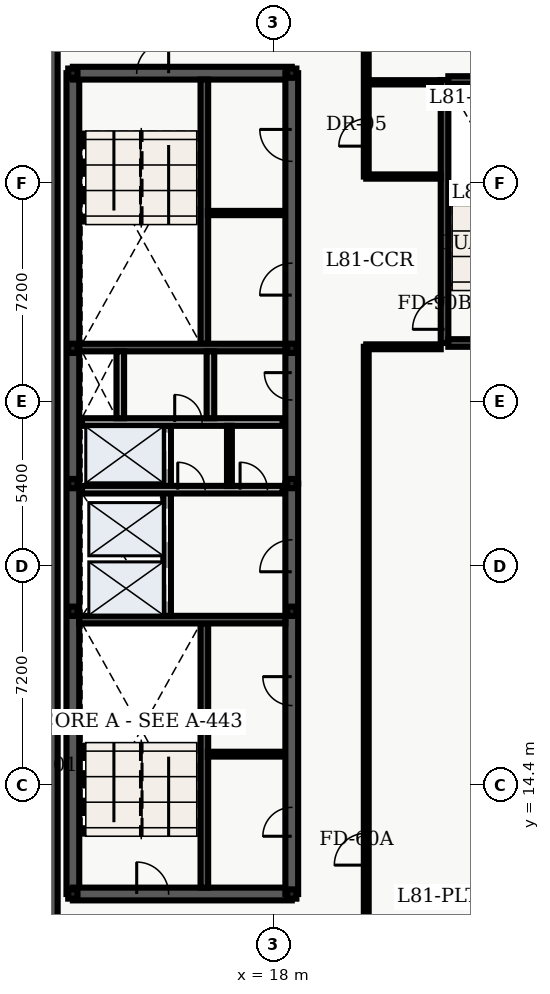
"""IFC4 building model, lengths in metres.
Left out: names, types, materials, properties, quantities, classifications, styles, units other than length and angle.
Written with IfcOpenShell. Run it as: python <this file> out.ifc"""

import sys

from ifc_helpers import new_model, entity, si_unit, converted_unit, direction, frame, origin_with_axes, origin_2d_with_axis, place, context, subcontext, project, spatial, polyline, rectangle, hollow_rectangle, outline, extrude, element, fill, save


model = new_model("IFC4")
c1 = context("Model", 3, precision=1e-05, world=origin_with_axes(), true_north=direction((0.0, 1.0)))
c2 = subcontext(c1, "Body", "Model", "MODEL_VIEW")
j1 = project(units=[si_unit("LENGTHUNIT", "METRE"), converted_unit("PLANEANGLEUNIT", "DEGREE", entity("IfcPlaneAngleMeasure", 0.017), si_unit("PLANEANGLEUNIT", "RADIAN"), dimensions=[0, 0, 0, 0, 0, 0, 0])], contexts=[c1])
p1 = place(None, origin_with_axes())
s1 = spatial("IfcSite", under=j1, at=p1, CompositionType="ELEMENT")
p2 = place(p1, origin_with_axes())
s2 = spatial("IfcBuilding", under=s1, at=p2, CompositionType="ELEMENT")
p3 = place(p2, frame((0.0, 0.0, 328.2), z_axis=(0.0, 0.0, 1.0), x_axis=(1.0, 0.0, 0.0)))
s3 = spatial("IfcBuildingStorey", under=s2, at=p3, CompositionType="ELEMENT", Elevation=328.2)
p4 = place(p3, frame((11.4, 10.8, 0.0), z_axis=(0.0, 0.0, 1.0), x_axis=(0.0, 1.0, 0.0)))
e1 = element("IfcWall", 1, at=p4, inside=s3, PredefinedType="SHEAR", context=c2, shape_type="SweptSolid", body=[
    extrude(outline(polyline([(0.0, -0.21), (27.0, -0.21), (27.0, 0.21), (0.0, 0.21), (0.0, -0.21)])), origin_with_axes(), (0.0, 0.0, 1.0), 3.64),
])
p5 = place(p3, frame((11.4, 10.8, 0.0), z_axis=(0.0, 0.0, 1.0), x_axis=(1.0, 0.0, 0.0)))
e2 = element("IfcWall", 2, at=p5, inside=s3, PredefinedType="SHEAR", context=c2, shape_type="SweptSolid", body=[
    extrude(outline(polyline([(0.0, -0.21), (7.2, -0.21), (7.2, 0.21), (0.0, 0.21), (0.0, -0.21)])), origin_with_axes(), (0.0, 0.0, 1.0), 3.64),
])
p6 = place(p5, frame((2.625, 0.0, 0.0), z_axis=(0.0, 0.0, 1.0), x_axis=(1.0, 0.0, 0.0)))
e3 = element("IfcOpeningElement", 3, at=p6, cuts=e2, PredefinedType="OPENING", context=c2, shape_type="SweptSolid", body=[
    extrude(rectangle(XDim=1.05, YDim=0.44, at=origin_2d_with_axis()), origin_with_axes(), (0.0, 0.0, 1.0), 2.15),
])
p7 = place(p3, frame((11.4, 37.8, 0.0), z_axis=(0.0, 0.0, 1.0), x_axis=(1.0, 0.0, 0.0)))
e4 = element("IfcWall", 4, at=p7, inside=s3, PredefinedType="SHEAR", context=c2, shape_type="SweptSolid", body=[
    extrude(outline(polyline([(0.0, -0.21), (7.2, -0.21), (7.2, 0.21), (0.0, 0.21), (0.0, -0.21)])), origin_with_axes(), (0.0, 0.0, 1.0), 3.64),
])
p8 = place(p7, frame((2.625, 0.0, 0.0), z_axis=(0.0, 0.0, 1.0), x_axis=(1.0, 0.0, 0.0)))
e5 = element("IfcOpeningElement", 5, at=p8, cuts=e4, PredefinedType="OPENING", context=c2, shape_type="SweptSolid", body=[
    extrude(rectangle(XDim=1.05, YDim=0.44, at=origin_2d_with_axis()), origin_with_axes(), (0.0, 0.0, 1.0), 2.15),
])
p9 = place(p3, frame((18.6, 10.8, 0.0), z_axis=(0.0, 0.0, 1.0), x_axis=(0.0, 1.0, 0.0)))
e6 = element("IfcWall", 6, at=p9, inside=s3, PredefinedType="SHEAR", context=c2, shape_type="SweptSolid", body=[
    extrude(outline(polyline([(0.0, -0.21), (13.5, -0.21), (13.5, 0.21), (0.0, 0.21), (0.0, -0.21)])), origin_with_axes(), (0.0, 0.0, 1.0), 3.64),
])
p10 = place(p9, frame((11.125, 0.0, 0.0), z_axis=(0.0, 0.0, 1.0), x_axis=(1.0, 0.0, 0.0)))
e7 = element("IfcOpeningElement", 7, at=p10, cuts=e6, PredefinedType="OPENING", context=c2, shape_type="SweptSolid", body=[
    extrude(rectangle(XDim=1.05, YDim=0.44, at=origin_2d_with_axis()), origin_with_axes(), (0.0, 0.0, 1.0), 2.15),
])
p11 = place(p9, frame((2.375, 0.0, 0.0), z_axis=(0.0, 0.0, 1.0), x_axis=(1.0, 0.0, 0.0)))
e8 = element("IfcOpeningElement", 8, at=p11, cuts=e6, PredefinedType="OPENING", context=c2, shape_type="SweptSolid", body=[
    extrude(rectangle(XDim=0.95, YDim=0.44, at=origin_2d_with_axis()), origin_with_axes(), (0.0, 0.0, 1.0), 2.15),
])
p12 = place(p9, frame((6.675, 0.0, 0.0), z_axis=(0.0, 0.0, 1.0), x_axis=(1.0, 0.0, 0.0)))
e9 = element("IfcOpeningElement", 9, at=p12, cuts=e6, PredefinedType="OPENING", context=c2, shape_type="SweptSolid", body=[
    extrude(rectangle(XDim=0.95, YDim=0.44, at=origin_2d_with_axis()), origin_with_axes(), (0.0, 0.0, 1.0), 2.15),
])
p13 = place(p3, frame((18.6, 24.3, 0.0), z_axis=(0.0, 0.0, 1.0), x_axis=(0.0, 1.0, 0.0)))
e10 = element("IfcWall", 10, at=p13, inside=s3, PredefinedType="SHEAR", context=c2, shape_type="SweptSolid", body=[
    extrude(outline(polyline([(0.0, -0.21), (13.5, -0.21), (13.5, 0.21), (0.0, 0.21), (0.0, -0.21)])), origin_with_axes(), (0.0, 0.0, 1.0), 3.64),
])
p14 = place(p13, frame((3.2, 0.0, 0.0), z_axis=(0.0, 0.0, 1.0), x_axis=(1.0, 0.0, 0.0)))
e11 = element("IfcOpeningElement", 11, at=p14, cuts=e10, PredefinedType="OPENING", context=c2, shape_type="SweptSolid", body=[
    extrude(rectangle(XDim=0.9, YDim=0.44, at=origin_2d_with_axis()), origin_with_axes(), (0.0, 0.0, 1.0), 2.15),
])
p15 = place(p13, frame((6.725, 0.0, 0.0), z_axis=(0.0, 0.0, 1.0), x_axis=(1.0, 0.0, 0.0)))
e12 = element("IfcOpeningElement", 12, at=p15, cuts=e10, PredefinedType="OPENING", context=c2, shape_type="SweptSolid", body=[
    extrude(rectangle(XDim=1.05, YDim=0.44, at=origin_2d_with_axis()), origin_with_axes(), (0.0, 0.0, 1.0), 2.15),
])
p16 = place(p13, frame((11.125, 0.0, 0.0), z_axis=(0.0, 0.0, 1.0), x_axis=(1.0, 0.0, 0.0)))
e13 = element("IfcOpeningElement", 13, at=p16, cuts=e10, PredefinedType="OPENING", context=c2, shape_type="SweptSolid", body=[
    extrude(rectangle(XDim=1.05, YDim=0.44, at=origin_2d_with_axis()), origin_with_axes(), (0.0, 0.0, 1.0), 2.15),
])
p17 = place(p3, frame((15.725, 11.01, 0.0), z_axis=(0.0, 0.0, 1.0), x_axis=(0.0, 1.0, 0.0)))
e14 = element("IfcWall", 14, at=p17, inside=s3, PredefinedType="SHEAR", context=c2, shape_type="SweptSolid", body=[
    extrude(outline(polyline([(0.0, -0.125), (8.69, -0.125), (8.69, 0.125), (0.0, 0.125), (0.0, -0.125)])), origin_with_axes(), (0.0, 0.0, 1.0), 3.64),
])
p18 = place(p3, frame((11.61, 19.825, 0.0), z_axis=(0.0, 0.0, 1.0), x_axis=(1.0, 0.0, 0.0)))
e15 = element("IfcWall", 15, at=p18, inside=s3, PredefinedType="SHEAR", context=c2, shape_type="SweptSolid", body=[
    extrude(outline(polyline([(0.0, -0.125), (6.78, -0.125), (6.78, 0.125), (0.0, 0.125), (0.0, -0.125)])), origin_with_axes(), (0.0, 0.0, 1.0), 3.64),
])
p19 = place(p3, frame((15.725, 28.9, 0.0), z_axis=(0.0, 0.0, 1.0), x_axis=(0.0, 1.0, 0.0)))
e16 = element("IfcWall", 16, at=p19, inside=s3, PredefinedType="SHEAR", context=c2, shape_type="SweptSolid", body=[
    extrude(outline(polyline([(0.0, -0.125), (8.69, -0.125), (8.69, 0.125), (0.0, 0.125), (0.0, -0.125)])), origin_with_axes(), (0.0, 0.0, 1.0), 3.64),
])
p20 = place(p3, frame((11.61, 28.775, 0.0), z_axis=(0.0, 0.0, 1.0), x_axis=(1.0, 0.0, 0.0)))
e17 = element("IfcWall", 17, at=p20, inside=s3, PredefinedType="SHEAR", context=c2, shape_type="SweptSolid", body=[
    extrude(outline(polyline([(0.0, -0.125), (6.78, -0.125), (6.78, 0.125), (0.0, 0.125), (0.0, -0.125)])), origin_with_axes(), (0.0, 0.0, 1.0), 3.64),
])
p21 = place(p3, frame((14.5, 19.95, 0.0), z_axis=(0.0, 0.0, 1.0), x_axis=(0.0, 1.0, 0.0)))
e18 = element("IfcWall", 18, at=p21, inside=s3, PredefinedType="SOLIDWALL", context=c2, shape_type="SweptSolid", body=[
    extrude(outline(polyline([(0.0, -0.125), (6.25, -0.125), (6.25, 0.125), (0.0, 0.125), (0.0, -0.125)])), origin_with_axes(), (0.0, 0.0, 1.0), 2.68),
])
p22 = place(p21, frame((1.025, 0.0, 0.0), z_axis=(0.0, 0.0, 1.0), x_axis=(1.0, 0.0, 0.0)))
e19 = element("IfcOpeningElement", 19, at=p22, cuts=e18, PredefinedType="OPENING", context=c2, shape_type="SweptSolid", body=[
    extrude(rectangle(XDim=1.1, YDim=0.27, at=origin_2d_with_axis()), origin_with_axes(), (0.0, 0.0, 1.0), 2.15),
])
p23 = place(p21, frame((2.975, 0.0, 0.0), z_axis=(0.0, 0.0, 1.0), x_axis=(1.0, 0.0, 0.0)))
e20 = element("IfcOpeningElement", 20, at=p23, cuts=e18, PredefinedType="OPENING", context=c2, shape_type="SweptSolid", body=[
    extrude(rectangle(XDim=1.1, YDim=0.27, at=origin_2d_with_axis()), origin_with_axes(), (0.0, 0.0, 1.0), 2.15),
])
p24 = place(p21, frame((5.425, 0.0, 0.0), z_axis=(0.0, 0.0, 1.0), x_axis=(1.0, 0.0, 0.0)))
e21 = element("IfcOpeningElement", 21, at=p24, cuts=e18, PredefinedType="OPENING", context=c2, shape_type="SweptSolid", body=[
    extrude(rectangle(XDim=1.2, YDim=0.27, at=origin_2d_with_axis()), origin_with_axes(), (0.0, 0.0, 1.0), 2.15),
])
p25 = place(p3, frame((11.7, 24.1, 0.0), z_axis=(0.0, 0.0, 1.0), x_axis=(1.0, 0.0, 0.0)))
e22 = element("IfcWall", 22, at=p25, inside=s3, PredefinedType="SOLIDWALL", context=c2, shape_type="SweptSolid", body=[
    extrude(outline(polyline([(0.0, -0.125), (6.6, -0.125), (6.6, 0.125), (0.0, 0.125), (0.0, -0.125)])), origin_with_axes(), (0.0, 0.0, 1.0), 2.68),
])
p26 = place(p25, frame((3.6, 0.0, 0.0), z_axis=(0.0, 0.0, 1.0), x_axis=(1.0, 0.0, 0.0)))
e23 = element("IfcOpeningElement", 23, at=p26, cuts=e22, PredefinedType="OPENING", context=c2, shape_type="SweptSolid", body=[
    extrude(rectangle(XDim=0.9, YDim=0.27, at=origin_2d_with_axis()), origin_with_axes(), (0.0, 0.0, 1.0), 2.15),
])
p27 = place(p25, frame((5.65, 0.0, 0.0), z_axis=(0.0, 0.0, 1.0), x_axis=(1.0, 0.0, 0.0)))
e24 = element("IfcOpeningElement", 24, at=p27, cuts=e22, PredefinedType="OPENING", context=c2, shape_type="SweptSolid", body=[
    extrude(rectangle(XDim=0.9, YDim=0.27, at=origin_2d_with_axis()), origin_with_axes(), (0.0, 0.0, 1.0), 2.15),
])
p28 = place(p3, frame((11.7, 26.325, 0.0), z_axis=(0.0, 0.0, 1.0), x_axis=(1.0, 0.0, 0.0)))
e25 = element("IfcWall", 25, at=p28, inside=s3, PredefinedType="SOLIDWALL", context=c2, shape_type="SweptSolid", body=[
    extrude(outline(polyline([(0.0, -0.125), (6.6, -0.125), (6.6, 0.125), (0.0, 0.125), (0.0, -0.125)])), origin_with_axes(), (0.0, 0.0, 1.0), 2.68),
])
p29 = place(p28, frame((3.5, 0.0, 0.0), z_axis=(0.0, 0.0, 1.0), x_axis=(1.0, 0.0, 0.0)))
e26 = element("IfcOpeningElement", 26, at=p29, cuts=e25, PredefinedType="OPENING", context=c2, shape_type="SweptSolid", body=[
    extrude(rectangle(XDim=0.9, YDim=0.27, at=origin_2d_with_axis()), origin_with_axes(), (0.0, 0.0, 1.0), 2.15),
])
for number, where, z_axis, x_axis in (
    (27, (12.96, 26.45, 0.0), (0.0, 0.0, 1.0), (0.0, 1.0, 0.0)),
    (28, (15.925, 26.45, 0.0), (0.0, 0.0, 1.0), (0.0, 1.0, 0.0)),
):
    element("IfcWall", number, at=place(p3, frame(where, z_axis=z_axis, x_axis=x_axis)), inside=s3, PredefinedType="SOLIDWALL", context=c2, shape_type="SweptSolid", body=[
        extrude(outline(polyline([(0.0, -0.125), (2.2, -0.125), (2.2, 0.125), (0.0, 0.125), (0.0, -0.125)])), origin_with_axes(), (0.0, 0.0, 1.0), 2.68),
    ])
p30 = place(p3, frame((23.625, 28.925, 0.0), z_axis=(0.0, 0.0, 1.0), x_axis=(0.0, 1.0, 0.0)))
e29 = element("IfcWall", 29, at=p30, inside=s3, PredefinedType="SHEAR", context=c2, shape_type="SweptSolid", body=[
    extrude(outline(polyline([(0.0, -0.125), (8.65, -0.125), (8.65, 0.125), (0.0, 0.125), (0.0, -0.125)])), origin_with_axes(), (0.0, 0.0, 1.0), 3.64),
])
p31 = place(p30, frame((0.975, 0.0, 0.0), z_axis=(0.0, 0.0, 1.0), x_axis=(1.0, 0.0, 0.0)))
e30 = element("IfcOpeningElement", 30, at=p31, cuts=e29, PredefinedType="OPENING", context=c2, shape_type="SweptSolid", body=[
    extrude(rectangle(XDim=1.05, YDim=0.27, at=origin_2d_with_axis()), origin_with_axes(), (0.0, 0.0, 1.0), 2.15),
])
for number, where, z_axis, x_axis in (
    (31, (23.75, 28.925, 0.0), (0.0, 0.0, 1.0), (1.0, 0.0, 0.0)),
    (32, (23.75, 37.575, 0.0), (0.0, 0.0, 1.0), (1.0, 0.0, 0.0)),
):
    element("IfcWall", number, at=place(p3, frame(where, z_axis=z_axis, x_axis=x_axis)), inside=s3, PredefinedType="SHEAR", context=c2, shape_type="SweptSolid", body=[
        extrude(outline(polyline([(0.0, -0.125), (3.9, -0.125), (3.9, 0.125), (0.0, 0.125), (0.0, -0.125)])), origin_with_axes(), (0.0, 0.0, 1.0), 3.64),
    ])
for number, where, z_axis, x_axis in (
    (33, (11.4, 10.8, 0.0), (0.0, 0.0, 1.0), (1.0, 0.0, 0.0)),
    (34, (11.4, 20.1, 0.0), (0.0, 0.0, 1.0), (1.0, 0.0, 0.0)),
    (35, (11.4, 24.3, 0.0), (0.0, 0.0, 1.0), (1.0, 0.0, 0.0)),
    (36, (11.4, 28.75, 0.0), (0.0, 0.0, 1.0), (1.0, 0.0, 0.0)),
    (37, (11.4, 37.8, 0.0), (0.0, 0.0, 1.0), (1.0, 0.0, 0.0)),
    (38, (18.6, 10.8, 0.0), (0.0, 0.0, 1.0), (1.0, 0.0, 0.0)),
    (39, (18.6, 20.1, 0.0), (0.0, 0.0, 1.0), (1.0, 0.0, 0.0)),
    (40, (18.6, 24.3, 0.0), (0.0, 0.0, 1.0), (1.0, 0.0, 0.0)),
    (41, (18.6, 28.75, 0.0), (0.0, 0.0, 1.0), (1.0, 0.0, 0.0)),
    (42, (18.6, 37.8, 0.0), (0.0, 0.0, 1.0), (1.0, 0.0, 0.0)),
):
    element("IfcColumn", number, at=place(p3, frame(where, z_axis=z_axis, x_axis=x_axis)), inside=s3, PredefinedType="COLUMN", context=c2, shape_type="SweptSolid", body=[
        extrude(hollow_rectangle(XDim=0.305, YDim=0.305, WallThickness=0.015, InnerFilletRadius=0.015, OuterFilletRadius=0.03, at=origin_2d_with_axis()), origin_with_axes(), (0.0, 0.0, 1.0), 3.9),
    ])
p32 = place(p3, frame((16.55, 24.22, 0.0), z_axis=(0.0, 0.0, 1.0), x_axis=(0.0, 1.0, 0.0)))
e43 = element("IfcWall", 43, at=p32, inside=s3, PredefinedType="PARTITIONING", context=c2, shape_type="SweptSolid", body=[
    extrude(outline(polyline([(0.0, -0.08), (1.98, -0.08), (1.98, 0.08), (0.0, 0.08), (0.0, -0.08)])), origin_with_axes(), (0.0, 0.0, 1.0), 2.68),
])
p33 = place(p3, frame((15.84, 15.4, 0.0), z_axis=(0.0, 0.0, 1.0), x_axis=(1.0, 0.0, 0.0)))
e44 = element("IfcWall", 44, at=p33, inside=s3, PredefinedType="PARTITIONING", context=c2, shape_type="SweptSolid", body=[
    extrude(outline(polyline([(0.0, -0.08), (2.46, -0.08), (2.46, 0.08), (0.0, 0.08), (0.0, -0.08)])), origin_with_axes(), (0.0, 0.0, 1.0), 2.68),
])
p34 = place(p3, frame((15.84, 33.2, 0.0), z_axis=(0.0, 0.0, 1.0), x_axis=(1.0, 0.0, 0.0)))
e45 = element("IfcWall", 45, at=p34, inside=s3, PredefinedType="PARTITIONING", context=c2, shape_type="SweptSolid", body=[
    extrude(outline(polyline([(0.0, -0.07), (2.46, -0.07), (2.46, 0.07), (0.0, 0.07), (0.0, -0.07)])), origin_with_axes(), (0.0, 0.0, 1.0), 2.68),
])
for number, where, z_axis, x_axis in (
    (46, (21.05, 34.4, 0.0), (0.0, 0.0, 1.0), (1.0, 0.0, 0.0)),
    (47, (21.05, 37.5, 0.0), (0.0, 0.0, 1.0), (1.0, 0.0, 0.0)),
):
    element("IfcWall", number, at=place(p3, frame(where, z_axis=z_axis, x_axis=x_axis)), inside=s3, PredefinedType="PARTITIONING", context=c2, shape_type="SweptSolid", body=[
        extrude(outline(polyline([(0.0, -0.07), (2.45, -0.07), (2.45, 0.07), (0.0, 0.07), (0.0, -0.07)])), origin_with_axes(), (0.0, 0.0, 1.0), 2.68),
    ])
p35 = place(p3, frame((21.05, 7.495, 0.0), z_axis=(0.0, 0.0, 1.0), x_axis=(0.0, 1.0, 0.0)))
e48 = element("IfcWall", 48, at=p35, inside=s3, PredefinedType="PARTITIONING", context=c2, shape_type="SweptSolid", body=[
    extrude(outline(polyline([(0.0, -0.08), (21.305, -0.08), (21.305, 0.08), (0.0, 0.08), (0.0, -0.08)])), origin_with_axes(), (0.0, 0.0, 1.0), 2.68),
])
p36 = place(p35, frame((4.78, 0.0, 0.0), z_axis=(0.0, 0.0, 1.0), x_axis=(1.0, 0.0, 0.0)))
e49 = element("IfcOpeningElement", 49, at=p36, cuts=e48, PredefinedType="OPENING", context=c2, shape_type="SweptSolid", body=[
    extrude(rectangle(XDim=1.05, YDim=0.18, at=origin_2d_with_axis()), origin_with_axes(), (0.0, 0.0, 1.0), 2.15),
])
p37 = place(p3, frame((21.05, 34.4, 0.0), z_axis=(0.0, 0.0, 1.0), x_axis=(0.0, 1.0, 0.0)))
e50 = element("IfcWall", 50, at=p37, inside=s3, PredefinedType="PARTITIONING", context=c2, shape_type="SweptSolid", body=[
    extrude(outline(polyline([(0.0, -0.08), (6.705, -0.08), (6.705, 0.08), (0.0, 0.08), (0.0, -0.08)])), origin_with_axes(), (0.0, 0.0, 1.0), 2.68),
])
p38 = place(p37, frame((1.45, 0.0, 0.0), z_axis=(0.0, 0.0, 1.0), x_axis=(1.0, 0.0, 0.0)))
e51 = element("IfcOpeningElement", 51, at=p38, cuts=e50, PredefinedType="OPENING", context=c2, shape_type="SweptSolid", body=[
    extrude(rectangle(XDim=0.9, YDim=0.18, at=origin_2d_with_axis()), origin_with_axes(), (0.0, 0.0, 1.0), 2.15),
])
p39 = place(p3, frame((21.05, 28.8, 0.0), z_axis=(0.0, 0.0, 1.0), x_axis=(1.0, 0.0, 0.0)))
e52 = element("IfcWall", 52, at=p39, inside=s3, PredefinedType="PARTITIONING", context=c2, shape_type="SweptSolid", body=[
    extrude(outline(polyline([(0.0, -0.08), (2.45, -0.08), (2.45, 0.08), (0.0, 0.08), (0.0, -0.08)])), origin_with_axes(), (0.0, 0.0, 1.0), 2.68),
])
p40 = place(p3, frame((10.75, 7.5, 0.0), z_axis=(0.0, 0.0, 1.0), x_axis=(0.0, 1.0, 0.0)))
e53 = element("IfcWall", 53, at=p40, inside=s3, PredefinedType="SOLIDWALL", context=c2, shape_type="SweptSolid", body=[
    extrude(outline(polyline([(0.0, -0.15), (33.9, -0.15), (33.9, 0.15), (0.0, 0.15), (0.0, -0.15)])), origin_with_axes(), (0.0, 0.0, 1.0), 3.64),
])
p41 = place(p21, frame((1.025, 0.0, 0.0), z_axis=(0.0, 0.0, 1.0), x_axis=(1.0, 0.0, 0.0)))
e54 = element("IfcDoor", 54, at=p41, inside=s3, OperationType="SLIDING_TO_LEFT", PredefinedType="DOOR", context=c2, shape_type="SweptSolid", body=[
    extrude(rectangle(XDim=1.1, YDim=0.09, at=origin_2d_with_axis()), origin_with_axes(), (0.0, 0.0, 1.0), 2.15),
])
fill(e19, e54)
p42 = place(p21, frame((2.975, 0.0, 0.0), z_axis=(0.0, 0.0, 1.0), x_axis=(1.0, 0.0, 0.0)))
e55 = element("IfcDoor", 55, at=p42, inside=s3, OperationType="SLIDING_TO_RIGHT", PredefinedType="DOOR", context=c2, shape_type="SweptSolid", body=[
    extrude(rectangle(XDim=1.1, YDim=0.09, at=origin_2d_with_axis()), origin_with_axes(), (0.0, 0.0, 1.0), 2.15),
])
fill(e20, e55)
p43 = place(p21, frame((5.425, 0.0, 0.0), z_axis=(0.0, 0.0, 1.0), x_axis=(1.0, 0.0, 0.0)))
e56 = element("IfcDoor", 56, at=p43, inside=s3, OperationType="DOUBLE_DOOR_SLIDING", PredefinedType="DOOR", context=c2, shape_type="SweptSolid", body=[
    extrude(rectangle(XDim=1.2, YDim=0.09, at=origin_2d_with_axis()), origin_with_axes(), (0.0, 0.0, 1.0), 2.15),
])
fill(e21, e56)
p44 = place(p13, frame((3.2, 0.0, 0.0), z_axis=(0.0, 0.0, 1.0), x_axis=(1.0, 0.0, 0.0)))
e57 = element("IfcDoor", 57, at=p44, inside=s3, OperationType="SINGLE_SWING_RIGHT", PredefinedType="DOOR", context=c2, shape_type="SweptSolid", body=[
    extrude(rectangle(XDim=0.9, YDim=0.09, at=origin_2d_with_axis()), origin_with_axes(), (0.0, 0.0, 1.0), 2.15),
])
fill(e11, e57)
p45 = place(p5, frame((2.625, 0.0, 0.0), z_axis=(0.0, 0.0, 1.0), x_axis=(1.0, 0.0, 0.0)))
e58 = element("IfcDoor", 58, at=p45, inside=s3, OperationType="SINGLE_SWING_LEFT", PredefinedType="DOOR", context=c2, shape_type="SweptSolid", body=[
    extrude(rectangle(XDim=1.05, YDim=0.09, at=origin_2d_with_axis()), origin_with_axes(), (0.0, 0.0, 1.0), 2.15),
])
fill(e3, e58)
p46 = place(p7, frame((2.625, 0.0, 0.0), z_axis=(0.0, 0.0, 1.0), x_axis=(1.0, 0.0, 0.0)))
e59 = element("IfcDoor", 59, at=p46, inside=s3, OperationType="SINGLE_SWING_RIGHT", PredefinedType="DOOR", context=c2, shape_type="SweptSolid", body=[
    extrude(rectangle(XDim=1.05, YDim=0.09, at=origin_2d_with_axis()), origin_with_axes(), (0.0, 0.0, 1.0), 2.15),
])
fill(e5, e59)
p47 = place(p9, frame((11.125, 0.0, 0.0), z_axis=(0.0, 0.0, 1.0), x_axis=(1.0, 0.0, 0.0)))
e60 = element("IfcDoor", 60, at=p47, inside=s3, OperationType="SINGLE_SWING_LEFT", PredefinedType="DOOR", context=c2, shape_type="SweptSolid", body=[
    extrude(rectangle(XDim=1.05, YDim=0.09, at=origin_2d_with_axis()), origin_with_axes(), (0.0, 0.0, 1.0), 2.15),
])
fill(e7, e60)
p48 = place(p25, frame((3.6, 0.0, 0.0), z_axis=(0.0, 0.0, 1.0), x_axis=(1.0, 0.0, 0.0)))
e61 = element("IfcDoor", 61, at=p48, inside=s3, OperationType="SINGLE_SWING_LEFT", PredefinedType="DOOR", context=c2, shape_type="SweptSolid", body=[
    extrude(rectangle(XDim=0.9, YDim=0.09, at=origin_2d_with_axis()), origin_with_axes(), (0.0, 0.0, 1.0), 2.15),
])
fill(e23, e61)
p49 = place(p25, frame((5.65, 0.0, 0.0), z_axis=(0.0, 0.0, 1.0), x_axis=(1.0, 0.0, 0.0)))
e62 = element("IfcDoor", 62, at=p49, inside=s3, OperationType="SINGLE_SWING_LEFT", PredefinedType="DOOR", context=c2, shape_type="SweptSolid", body=[
    extrude(rectangle(XDim=0.9, YDim=0.09, at=origin_2d_with_axis()), origin_with_axes(), (0.0, 0.0, 1.0), 2.15),
])
fill(e24, e62)
p50 = place(p28, frame((3.5, 0.0, 0.0), z_axis=(0.0, 0.0, 1.0), x_axis=(1.0, 0.0, 0.0)))
e63 = element("IfcDoor", 63, at=p50, inside=s3, OperationType="SINGLE_SWING_LEFT", PredefinedType="DOOR", context=c2, shape_type="SweptSolid", body=[
    extrude(rectangle(XDim=0.9, YDim=0.09, at=origin_2d_with_axis()), origin_with_axes(), (0.0, 0.0, 1.0), 2.15),
])
fill(e26, e63)
p51 = place(p9, frame((2.375, 0.0, 0.0), z_axis=(0.0, 0.0, 1.0), x_axis=(1.0, 0.0, 0.0)))
e64 = element("IfcDoor", 64, at=p51, inside=s3, OperationType="SINGLE_SWING_LEFT", PredefinedType="DOOR", context=c2, shape_type="SweptSolid", body=[
    extrude(rectangle(XDim=0.95, YDim=0.09, at=origin_2d_with_axis()), origin_with_axes(), (0.0, 0.0, 1.0), 2.15),
])
fill(e8, e64)
p52 = place(p9, frame((6.675, 0.0, 0.0), z_axis=(0.0, 0.0, 1.0), x_axis=(1.0, 0.0, 0.0)))
e65 = element("IfcDoor", 65, at=p52, inside=s3, OperationType="SINGLE_SWING_RIGHT", PredefinedType="DOOR", context=c2, shape_type="SweptSolid", body=[
    extrude(rectangle(XDim=0.95, YDim=0.09, at=origin_2d_with_axis()), origin_with_axes(), (0.0, 0.0, 1.0), 2.15),
])
fill(e9, e65)
p53 = place(p13, frame((6.725, 0.0, 0.0), z_axis=(0.0, 0.0, 1.0), x_axis=(1.0, 0.0, 0.0)))
e66 = element("IfcDoor", 66, at=p53, inside=s3, OperationType="SINGLE_SWING_LEFT", PredefinedType="DOOR", context=c2, shape_type="SweptSolid", body=[
    extrude(rectangle(XDim=1.05, YDim=0.09, at=origin_2d_with_axis()), origin_with_axes(), (0.0, 0.0, 1.0), 2.15),
])
fill(e12, e66)
p54 = place(p13, frame((11.125, 0.0, 0.0), z_axis=(0.0, 0.0, 1.0), x_axis=(1.0, 0.0, 0.0)))
e67 = element("IfcDoor", 67, at=p54, inside=s3, OperationType="SINGLE_SWING_RIGHT", PredefinedType="DOOR", context=c2, shape_type="SweptSolid", body=[
    extrude(rectangle(XDim=1.05, YDim=0.09, at=origin_2d_with_axis()), origin_with_axes(), (0.0, 0.0, 1.0), 2.15),
])
fill(e13, e67)
p55 = place(p30, frame((0.975, 0.0, 0.0), z_axis=(0.0, 0.0, 1.0), x_axis=(1.0, 0.0, 0.0)))
e68 = element("IfcDoor", 68, at=p55, inside=s3, OperationType="SINGLE_SWING_LEFT", PredefinedType="DOOR", context=c2, shape_type="SweptSolid", body=[
    extrude(rectangle(XDim=1.05, YDim=0.09, at=origin_2d_with_axis()), origin_with_axes(), (0.0, 0.0, 1.0), 2.15),
])
fill(e30, e68)
p56 = place(p37, frame((1.45, 0.0, 0.0), z_axis=(0.0, 0.0, 1.0), x_axis=(1.0, 0.0, 0.0)))
e69 = element("IfcDoor", 69, at=p56, inside=s3, OperationType="SINGLE_SWING_LEFT", PredefinedType="DOOR", context=c2, shape_type="SweptSolid", body=[
    extrude(rectangle(XDim=0.9, YDim=0.09, at=origin_2d_with_axis()), origin_with_axes(), (0.0, 0.0, 1.0), 2.15),
])
fill(e51, e69)
p57 = place(p35, frame((4.78, 0.0, 0.0), z_axis=(0.0, 0.0, 1.0), x_axis=(1.0, 0.0, 0.0)))
e70 = element("IfcDoor", 70, at=p57, inside=s3, OperationType="SINGLE_SWING_LEFT", PredefinedType="DOOR", context=c2, shape_type="SweptSolid", body=[
    extrude(rectangle(XDim=1.05, YDim=0.09, at=origin_2d_with_axis()), origin_with_axes(), (0.0, 0.0, 1.0), 2.15),
])
fill(e49, e70)
save(model, sys.argv[1])
